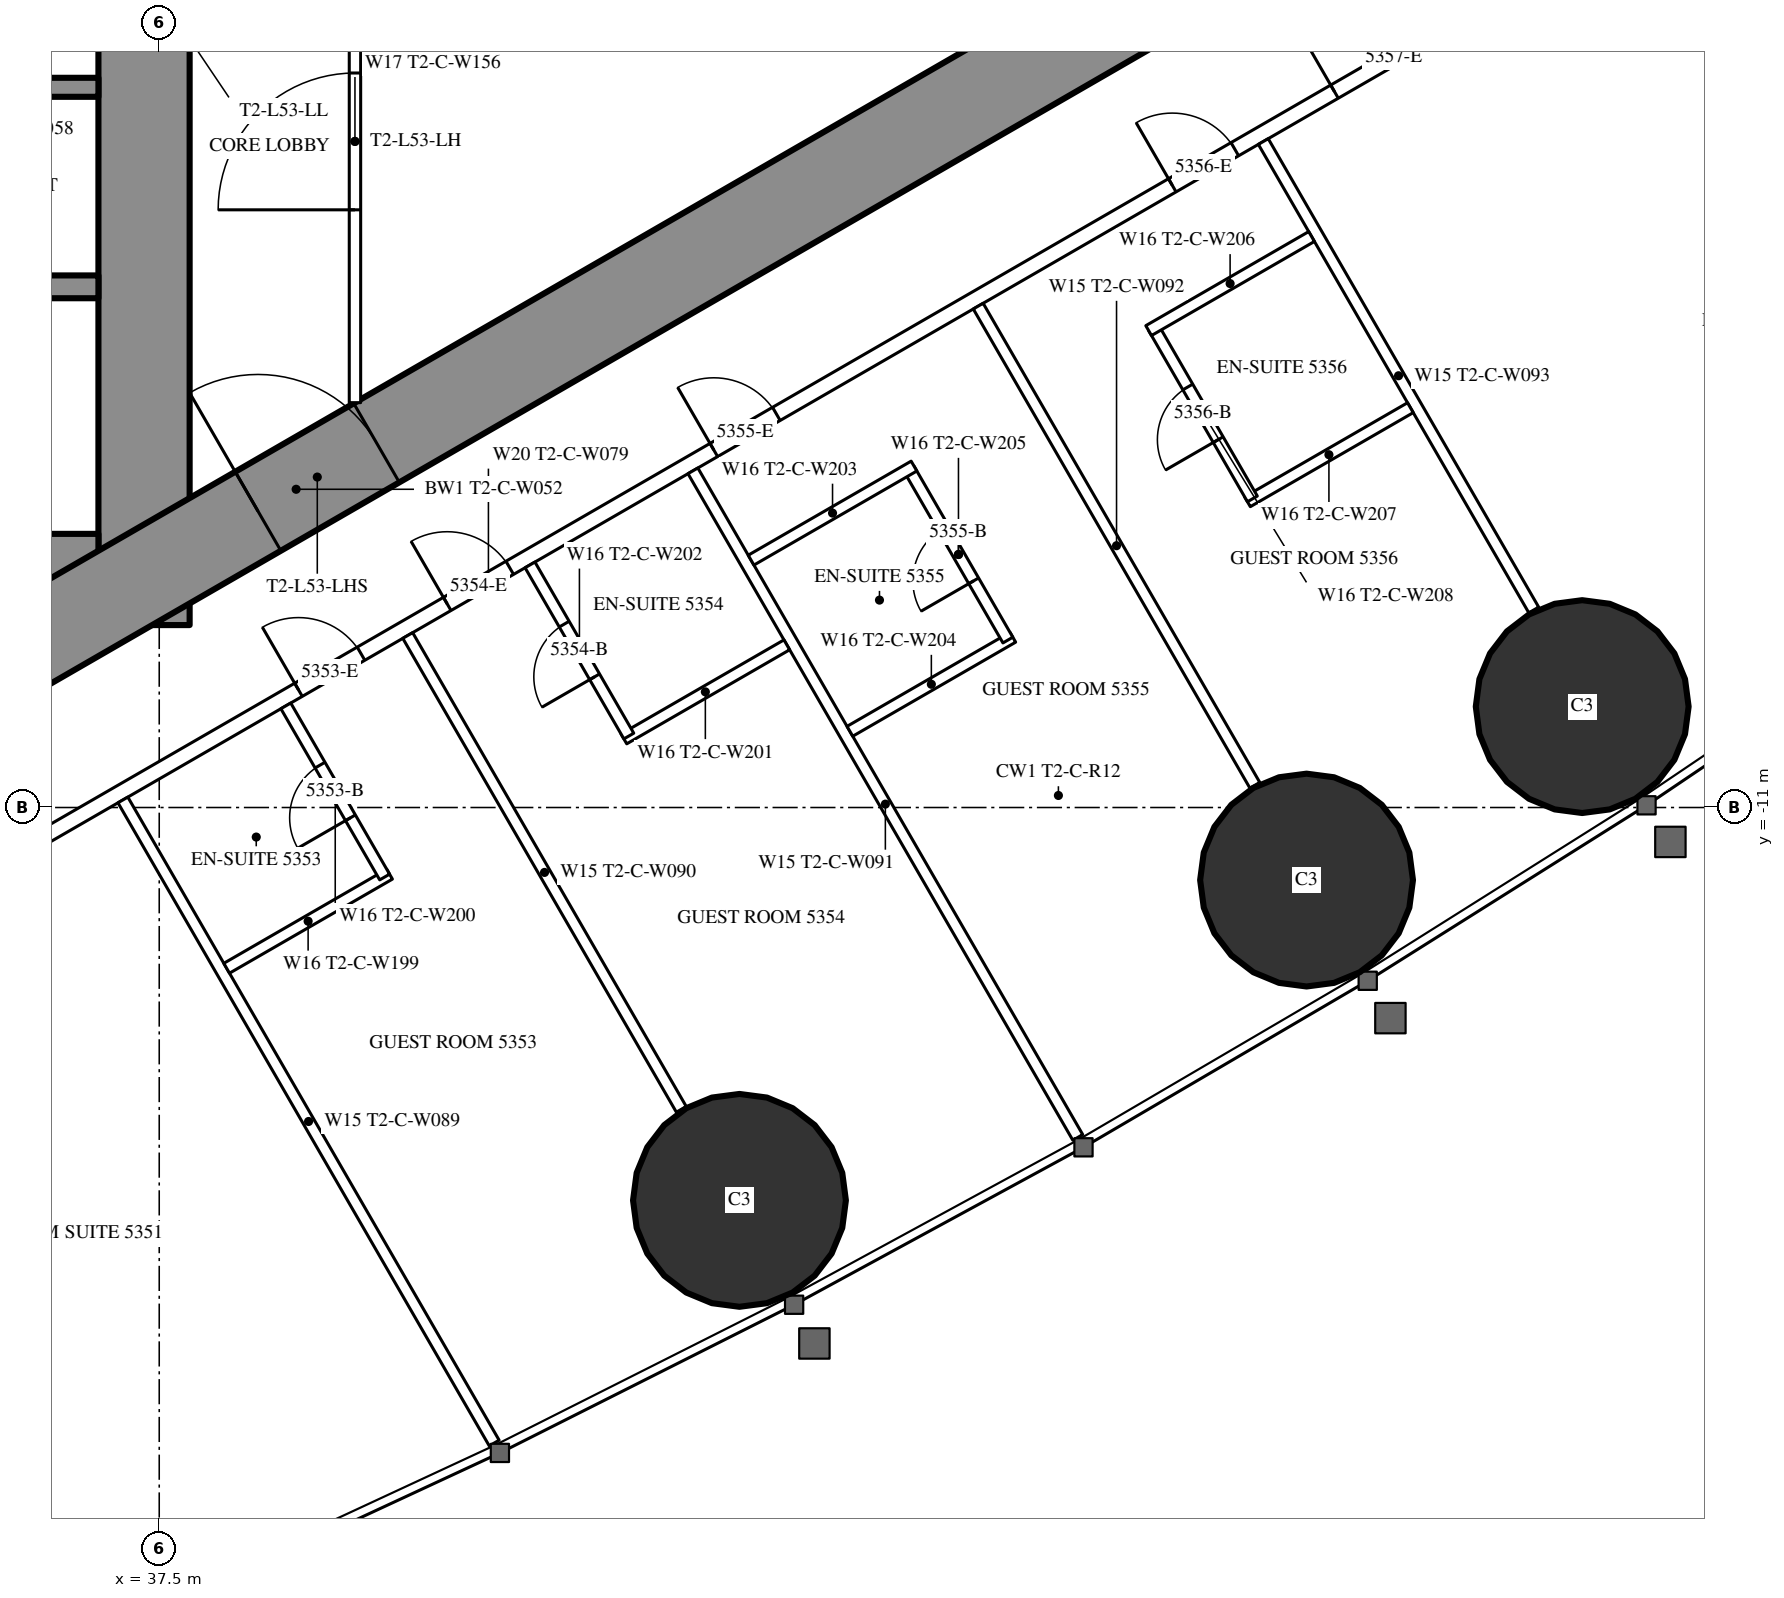
"""IFC4 building model, lengths in metres.
Left out: names, types, materials, properties, quantities, classifications, styles, units other than length and angle.
Written with IfcOpenShell. Run it as: python <this file> out.ifc"""

import sys

from ifc_helpers import new_model, si_unit, direction, frame, frame_2d, origin, origin_2d, place, context, subcontext, project, spatial, rectangle, circle, extrude, element, fill, save


model = new_model("IFC4")
c1 = context("Model", 3, precision=1e-05, world=origin(), true_north=direction((0.0, 1.0)))
c2 = subcontext(c1, "Body", "Model", "MODEL_VIEW")
j1 = project(units=[si_unit("LENGTHUNIT", "METRE"), si_unit("PLANEANGLEUNIT", "RADIAN")], contexts=[c1])
p1 = place(None, origin())
s1 = spatial("IfcSite", under=j1, at=p1, CompositionType="ELEMENT")
p2 = place(p1, origin())
s2 = spatial("IfcBuilding", under=s1, at=p2, CompositionType="ELEMENT")
p3 = place(p2, frame((0.0, 0.0, 198.3)))
s3 = spatial("IfcBuildingStorey", under=s2, at=p3, CompositionType="ELEMENT", Elevation=198.3)
for number, where, z_axis, x_axis in (
    (1, (45.134, -16.168, 0.0), (0.0, 0.0, 1.0), (1.0, 0.0, 0.0)),
    (2, (52.594, -11.955, 0.0), (0.0, 0.0, 1.0), (1.0, 0.0, 0.0)),
    (3, (56.221, -9.672, 0.0), (0.0, 0.0, 1.0), (1.0, 0.0, 0.0)),
):
    element("IfcColumn", number, at=place(p3, frame(where, z_axis=z_axis, x_axis=x_axis)), inside=s3, PredefinedType="COLUMN", context=c2, shape_type="SweptSolid", body=[
        extrude(circle(Radius=1.4, at=origin_2d()), origin(), (0.0, 0.0, 1.0), 3.5),
    ])
p4 = place(p3, frame((37.3, -8.6, 0.0), z_axis=(0.0, 0.0, 1.0), x_axis=(0.0, 1.0, 0.0)))
e4 = element("IfcWall", 4, at=p4, inside=s3, PredefinedType="SHEAR", context=c2, shape_type="SweptSolid", body=[
    extrude(rectangle(XDim=17.2, YDim=1.2, at=frame_2d((8.6, 0.0))), origin(), (0.0, 0.0, 1.0), 3.5),
])
p5 = place(p4, frame((7.7, 0.0, 0.0)))
e5 = element("IfcOpeningElement", 5, at=p5, cuts=e4, PredefinedType="OPENING", context=c2, shape_type="SweptSolid", body=[
    extrude(rectangle(XDim=1.8, YDim=2.2, at=frame_2d((0.9, 1.1))), frame((0.0, 0.61, 0.0), z_axis=(0.0, -1.0, 0.0), x_axis=(1.0, 0.0, 0.0)), (0.0, 0.0, 1.0), 1.22),
])
p6 = place(p3, frame((28.3, -8.0, 0.0), z_axis=(0.0, 0.0, 1.0), x_axis=(1.0, 0.0, 0.0)))
e6 = element("IfcWall", 6, at=p6, inside=s3, PredefinedType="SHEAR", context=c2, shape_type="SweptSolid", body=[
    extrude(rectangle(XDim=8.4, YDim=1.2, at=frame_2d((4.2, 0.0))), origin(), (0.0, 0.0, 1.0), 3.5),
])
p7 = place(p6, frame((0.25, 0.0, 0.0)))
e7 = element("IfcOpeningElement", 7, at=p7, cuts=e6, PredefinedType="OPENING", context=c2, shape_type="SweptSolid", body=[
    extrude(rectangle(XDim=1.0, YDim=2.2, at=frame_2d((0.5, 1.1))), frame((0.0, 0.61, 0.0), z_axis=(0.0, -1.0, 0.0), x_axis=(1.0, 0.0, 0.0)), (0.0, 0.0, 1.0), 1.22),
])
p8 = place(p3, frame((28.3, -4.15, 0.0), z_axis=(0.0, 0.0, 1.0), x_axis=(1.0, 0.0, 0.0)))
e8 = element("IfcWall", 8, at=p8, inside=s3, PredefinedType="SHEAR", context=c2, shape_type="SweptSolid", body=[
    extrude(rectangle(XDim=8.4, YDim=0.3, at=frame_2d((4.2, 0.0))), origin(), (0.0, 0.0, 1.0), 3.5),
])
p9 = place(p3, frame((34.25, -1.525, 0.0), z_axis=(0.0, 0.0, 1.0), x_axis=(1.0, 0.0, 0.0)))
e9 = element("IfcWall", 9, at=p9, inside=s3, PredefinedType="SHEAR", context=c2, shape_type="SweptSolid", body=[
    extrude(rectangle(XDim=2.45, YDim=0.25, at=frame_2d((1.225, 0.0))), origin(), (0.0, 0.0, 1.0), 3.5),
])
p10 = place(p3, frame((27.2, -13.8, 0.0), z_axis=(0.0, 0.0, 1.0), x_axis=(0.866027159892, 0.499996958321, 0.0)))
e10 = element("IfcWall", 10, at=p10, inside=s3, PredefinedType="SHEAR", context=c2, shape_type="SweptSolid", body=[
    extrude(rectangle(XDim=27.947, YDim=1.2, at=frame_2d((13.973, 0.0))), origin(), (0.0, 0.0, 1.0), 3.5),
])
p11 = place(p10, frame((4.6, 0.0, 0.0)))
e11 = element("IfcOpeningElement", 11, at=p11, cuts=e10, PredefinedType="OPENING", context=c2, shape_type="SweptSolid", body=[
    extrude(rectangle(XDim=1.0, YDim=2.2, at=frame_2d((0.5, 1.1))), frame((0.0, 0.61, 0.0), z_axis=(0.0, -1.0, 0.0), x_axis=(1.0, 0.0, 0.0)), (0.0, 0.0, 1.0), 1.22),
])
p12 = place(p10, frame((13.395, 0.0, 0.0)))
e12 = element("IfcOpeningElement", 12, at=p12, cuts=e10, PredefinedType="OPENING", context=c2, shape_type="SweptSolid", body=[
    extrude(rectangle(XDim=1.8, YDim=2.2, at=frame_2d((0.9, 1.1))), frame((0.0, 0.61, 0.0), z_axis=(0.0, -1.0, 0.0), x_axis=(1.0, 0.0, 0.0)), (0.0, 0.0, 1.0), 1.22),
])
p13 = place(p3, frame((27.959, -16.017, 0.0), z_axis=(0.0, 0.0, 1.0), x_axis=(0.866024151371, 0.500002169237, 0.0)))
e13 = element("IfcWall", 13, at=p13, inside=s3, PredefinedType="PARTITIONING", context=c2, shape_type="SweptSolid", body=[
    extrude(rectangle(XDim=32.034, YDim=0.2, at=frame_2d((16.017, 0.0))), origin(), (0.0, 0.0, 1.0), 3.25),
])
p14 = place(p13, frame((0.6, 0.0, 0.0)))
e14 = element("IfcOpeningElement", 14, at=p14, cuts=e13, PredefinedType="OPENING", context=c2, shape_type="SweptSolid", body=[
    extrude(rectangle(XDim=0.95, YDim=2.2, at=frame_2d((0.475, 1.1))), frame((0.0, 0.11, 0.0), z_axis=(0.0, -1.0, 0.0), x_axis=(1.0, 0.0, 0.0)), (0.0, 0.0, 1.0), 0.22),
])
p15 = place(p13, frame((13.132, 0.0, 0.0)))
e15 = element("IfcOpeningElement", 15, at=p15, cuts=e13, PredefinedType="OPENING", context=c2, shape_type="SweptSolid", body=[
    extrude(rectangle(XDim=0.95, YDim=2.2, at=frame_2d((0.475, 1.1))), frame((0.0, 0.11, 0.0), z_axis=(0.0, -1.0, 0.0), x_axis=(1.0, 0.0, 0.0)), (0.0, 0.0, 1.0), 0.22),
])
p16 = place(p13, frame((15.391, 0.0, 0.0)))
e16 = element("IfcOpeningElement", 16, at=p16, cuts=e13, PredefinedType="OPENING", context=c2, shape_type="SweptSolid", body=[
    extrude(rectangle(XDim=0.95, YDim=2.2, at=frame_2d((0.475, 1.1))), frame((0.0, 0.11, 0.0), z_axis=(0.0, -1.0, 0.0), x_axis=(1.0, 0.0, 0.0)), (0.0, 0.0, 1.0), 0.22),
])
p17 = place(p13, frame((19.441, 0.0, 0.0)))
e17 = element("IfcOpeningElement", 17, at=p17, cuts=e13, PredefinedType="OPENING", context=c2, shape_type="SweptSolid", body=[
    extrude(rectangle(XDim=0.95, YDim=2.2, at=frame_2d((0.475, 1.1))), frame((0.0, 0.11, 0.0), z_axis=(0.0, -1.0, 0.0), x_axis=(1.0, 0.0, 0.0)), (0.0, 0.0, 1.0), 0.22),
])
p18 = place(p13, frame((26.406, 0.0, 0.0)))
e18 = element("IfcOpeningElement", 18, at=p18, cuts=e13, PredefinedType="OPENING", context=c2, shape_type="SweptSolid", body=[
    extrude(rectangle(XDim=0.95, YDim=2.2, at=frame_2d((0.475, 1.1))), frame((0.0, 0.11, 0.0), z_axis=(0.0, -1.0, 0.0), x_axis=(1.0, 0.0, 0.0)), (0.0, 0.0, 1.0), 0.22),
])
p19 = place(p13, frame((28.87, 0.0, 0.0)))
e19 = element("IfcOpeningElement", 19, at=p19, cuts=e13, PredefinedType="OPENING", context=c2, shape_type="SweptSolid", body=[
    extrude(rectangle(XDim=1.8, YDim=2.2, at=frame_2d((0.9, 1.1))), frame((0.0, 0.11, 0.0), z_axis=(0.0, -1.0, 0.0), x_axis=(1.0, 0.0, 0.0)), (0.0, 0.0, 1.0), 0.22),
])
p20 = place(p3, frame((37.022, -10.9, 0.0), z_axis=(0.0, 0.0, 1.0), x_axis=(0.499998620953, -0.866026199976, 0.0)))
e20 = element("IfcWall", 20, at=p20, inside=s3, PredefinedType="PARTITIONING", context=c2, shape_type="SweptSolid", body=[
    extrude(rectangle(XDim=9.77, YDim=0.15, at=frame_2d((4.885, 0.0))), origin(), (0.0, 0.0, 1.0), 3.25),
])
p21 = place(p3, frame((40.769, -8.737, 0.0), z_axis=(0.0, 0.0, 1.0), x_axis=(0.500013115284, -0.866017831539, 0.0)))
e21 = element("IfcWall", 21, at=p21, inside=s3, PredefinedType="PARTITIONING", context=c2, shape_type="SweptSolid", body=[
    extrude(rectangle(XDim=7.198, YDim=0.15, at=frame_2d((3.599, 0.0))), origin(), (0.0, 0.0, 1.0), 2.3),
])
p22 = place(p3, frame((44.521, -6.571, 0.0), z_axis=(0.0, 0.0, 1.0), x_axis=(0.500010457486, -0.866019366068, 0.0)))
e22 = element("IfcWall", 22, at=p22, inside=s3, PredefinedType="PARTITIONING", context=c2, shape_type="SweptSolid", body=[
    extrude(rectangle(XDim=10.126, YDim=0.15, at=frame_2d((5.063, 0.0))), origin(), (0.0, 0.0, 1.0), 3.25),
])
p23 = place(p3, frame((48.275, -4.404, 0.0), z_axis=(0.0, 0.0, 1.0), x_axis=(0.500006004368, -0.866021937133, 0.0)))
e23 = element("IfcWall", 23, at=p23, inside=s3, PredefinedType="PARTITIONING", context=c2, shape_type="SweptSolid", body=[
    extrude(rectangle(XDim=7.279, YDim=0.15, at=frame_2d((3.64, 0.0))), origin(), (0.0, 0.0, 1.0), 2.3),
])
p24 = place(p3, frame((52.025, -2.238, 0.0), z_axis=(0.0, 0.0, 1.0), x_axis=(0.499983785035, -0.866034765296, 0.0)))
e24 = element("IfcWall", 24, at=p24, inside=s3, PredefinedType="PARTITIONING", context=c2, shape_type="SweptSolid", body=[
    extrude(rectangle(XDim=7.116, YDim=0.15, at=frame_2d((3.558, 0.0))), origin(), (0.0, 0.0, 1.0), 2.3),
])
p25 = place(p3, frame((38.387, -13.115, 0.0), z_axis=(0.0, 0.0, 1.0), x_axis=(0.866073894602, 0.499916002032, 0.0)))
e25 = element("IfcWall", 25, at=p25, inside=s3, PredefinedType="PARTITIONING", context=c2, shape_type="SweptSolid", body=[
    extrude(rectangle(XDim=2.475, YDim=0.15, at=frame_2d((1.238, 0.0))), origin(), (0.0, 0.0, 1.0), 3.25),
])
p26 = place(p3, frame((39.166, -9.663, 0.0), z_axis=(0.0, 0.0, 1.0), x_axis=(0.500006934395, -0.866021400173, 0.0)))
e26 = element("IfcWall", 26, at=p26, inside=s3, PredefinedType="PARTITIONING", context=c2, shape_type="SweptSolid", body=[
    extrude(rectangle(XDim=2.6, YDim=0.15, at=frame_2d((1.3, 0.0))), origin(), (0.0, 0.0, 1.0), 3.25),
])
p27 = place(p26, frame((0.9, 0.0, 0.0)))
e27 = element("IfcOpeningElement", 27, at=p27, cuts=e26, PredefinedType="OPENING", context=c2, shape_type="SweptSolid", body=[
    extrude(rectangle(XDim=0.8, YDim=2.2, at=frame_2d((0.4, 1.1))), frame((0.0, 0.085, 0.0), z_axis=(0.0, -1.0, 0.0), x_axis=(1.0, 0.0, 0.0)), (0.0, 0.0, 1.0), 0.17),
])
p28 = place(p3, frame((43.613, -10.097, 0.0), z_axis=(0.0, 0.0, 1.0), x_axis=(0.866031185235, 0.4999899861, 0.0)))
e28 = element("IfcWall", 28, at=p28, inside=s3, PredefinedType="PARTITIONING", context=c2, shape_type="SweptSolid", body=[
    extrude(rectangle(XDim=2.475, YDim=0.15, at=frame_2d((1.238, 0.0))), origin(), (0.0, 0.0, 1.0), 3.25),
])
p29 = place(p3, frame((42.378, -7.808, 0.0), z_axis=(0.0, 0.0, 1.0), x_axis=(0.500006934395, -0.866021400173, 0.0)))
e29 = element("IfcWall", 29, at=p29, inside=s3, PredefinedType="PARTITIONING", context=c2, shape_type="SweptSolid", body=[
    extrude(rectangle(XDim=2.6, YDim=0.15, at=frame_2d((1.3, 0.0))), origin(), (0.0, 0.0, 1.0), 3.25),
])
p30 = place(p29, frame((0.9, 0.0, 0.0)))
e30 = element("IfcOpeningElement", 30, at=p30, cuts=e29, PredefinedType="OPENING", context=c2, shape_type="SweptSolid", body=[
    extrude(rectangle(XDim=0.8, YDim=2.2, at=frame_2d((0.4, 1.1))), frame((0.0, 0.085, 0.0), z_axis=(0.0, -1.0, 0.0), x_axis=(1.0, 0.0, 0.0)), (0.0, 0.0, 1.0), 0.17),
])
p31 = place(p3, frame((46.586, -9.997, 0.0), z_axis=(0.0, 0.0, 1.0), x_axis=(0.866006523861, 0.500032699561, 0.0)))
e31 = element("IfcWall", 31, at=p31, inside=s3, PredefinedType="PARTITIONING", context=c2, shape_type="SweptSolid", body=[
    extrude(rectangle(XDim=2.475, YDim=0.15, at=frame_2d((1.237, 0.0))), origin(), (0.0, 0.0, 1.0), 3.25),
])
p32 = place(p3, frame((47.365, -6.546, 0.0), z_axis=(0.0, 0.0, 1.0), x_axis=(0.500006934395, -0.866021400173, 0.0)))
e32 = element("IfcWall", 32, at=p32, inside=s3, PredefinedType="PARTITIONING", context=c2, shape_type="SweptSolid", body=[
    extrude(rectangle(XDim=2.6, YDim=0.15, at=frame_2d((1.3, 0.0))), origin(), (0.0, 0.0, 1.0), 3.25),
])
p33 = place(p32, frame((0.9, 0.0, 0.0)))
e33 = element("IfcOpeningElement", 33, at=p33, cuts=e32, PredefinedType="OPENING", context=c2, shape_type="SweptSolid", body=[
    extrude(rectangle(XDim=0.8, YDim=2.2, at=frame_2d((0.4, 1.1))), frame((0.0, 0.085, 0.0), z_axis=(0.0, -1.0, 0.0), x_axis=(1.0, 0.0, 0.0)), (0.0, 0.0, 1.0), 0.17),
])
for number, where, z_axis, x_axis in (
    (34, (45.286, -7.746, 0.0), (0.0, 0.0, 1.0), (0.866, 0.5, 0.0)),
    (35, (51.817, -6.978, 0.0), (0.0, 0.0, 1.0), (0.866, 0.5, 0.0)),
):
    element("IfcWall", number, at=place(p3, frame(where, z_axis=z_axis, x_axis=x_axis)), inside=s3, PredefinedType="PARTITIONING", context=c2, shape_type="SweptSolid", body=[
        extrude(rectangle(XDim=2.475, YDim=0.15, at=frame_2d((1.237, 0.0))), origin(), (0.0, 0.0, 1.0), 3.25),
    ])
p34 = place(p3, frame((50.582, -4.688, 0.0), z_axis=(0.0, 0.0, 1.0), x_axis=(0.500006934395, -0.866021400173, 0.0)))
e36 = element("IfcWall", 36, at=p34, inside=s3, PredefinedType="PARTITIONING", context=c2, shape_type="SweptSolid", body=[
    extrude(rectangle(XDim=2.6, YDim=0.15, at=frame_2d((1.3, 0.0))), origin(), (0.0, 0.0, 1.0), 3.25),
])
p35 = place(p34, frame((0.9, 0.0, 0.0)))
e37 = element("IfcOpeningElement", 37, at=p35, cuts=e36, PredefinedType="OPENING", context=c2, shape_type="SweptSolid", body=[
    extrude(rectangle(XDim=0.8, YDim=2.2, at=frame_2d((0.4, 1.1))), frame((0.0, 0.085, 0.0), z_axis=(0.0, -1.0, 0.0), x_axis=(1.0, 0.0, 0.0)), (0.0, 0.0, 1.0), 0.17),
])
p36 = place(p3, frame((50.517, -4.726, 0.0), z_axis=(0.0, 0.0, 1.0), x_axis=(0.866031185235, 0.4999899861, 0.0)))
e38 = element("IfcWall", 38, at=p36, inside=s3, PredefinedType="PARTITIONING", context=c2, shape_type="SweptSolid", body=[
    extrude(rectangle(XDim=2.475, YDim=0.15, at=frame_2d((1.238, 0.0))), origin(), (0.0, 0.0, 1.0), 3.25),
])
p37 = place(p3, frame((40.075, -5.674, 0.0), z_axis=(0.0, 0.0, 1.0), x_axis=(0.0, 1.0, 0.0)))
e39 = element("IfcWall", 39, at=p37, inside=s3, PredefinedType="PARTITIONING", context=c2, shape_type="SweptSolid", body=[
    extrude(rectangle(XDim=6.874, YDim=0.15, at=frame_2d((3.437, 0.0))), origin(), (0.0, 0.0, 1.0), 3.25),
])
p38 = place(p37, frame((2.537, 0.0, 0.0)))
e40 = element("IfcOpeningElement", 40, at=p38, cuts=e39, PredefinedType="OPENING", context=c2, shape_type="SweptSolid", body=[
    extrude(rectangle(XDim=1.8, YDim=2.2, at=frame_2d((0.9, 1.1))), frame((0.0, 0.085, 0.0), z_axis=(0.0, -1.0, 0.0), x_axis=(1.0, 0.0, 0.0)), (0.0, 0.0, 1.0), 0.17),
])
p39 = place(p27, origin())
e41 = element("IfcDoor", 41, at=p39, inside=s3, OperationType="SINGLE_SWING_RIGHT", PredefinedType="DOOR", context=c2, shape_type="SweptSolid", body=[
    extrude(rectangle(XDim=0.8, YDim=2.2, at=frame_2d((0.4, 1.1))), frame((0.0, 0.025, 0.0), z_axis=(0.0, -1.0, 0.0), x_axis=(1.0, 0.0, 0.0)), (0.0, 0.0, 1.0), 0.05),
])
fill(e27, e41)
p40 = place(p15, origin())
e42 = element("IfcDoor", 42, at=p40, inside=s3, OperationType="SINGLE_SWING_LEFT", PredefinedType="DOOR", context=c2, shape_type="SweptSolid", body=[
    extrude(rectangle(XDim=0.95, YDim=2.2, at=frame_2d((0.475, 1.1))), frame((0.0, 0.025, 0.0), z_axis=(0.0, -1.0, 0.0), x_axis=(1.0, 0.0, 0.0)), (0.0, 0.0, 1.0), 0.05),
])
fill(e15, e42)
p41 = place(p30, origin())
e43 = element("IfcDoor", 43, at=p41, inside=s3, OperationType="SINGLE_SWING_RIGHT", PredefinedType="DOOR", context=c2, shape_type="SweptSolid", body=[
    extrude(rectangle(XDim=0.8, YDim=2.2, at=frame_2d((0.4, 1.1))), frame((0.0, 0.025, 0.0), z_axis=(0.0, -1.0, 0.0), x_axis=(1.0, 0.0, 0.0)), (0.0, 0.0, 1.0), 0.05),
])
fill(e30, e43)
p42 = place(p16, origin())
e44 = element("IfcDoor", 44, at=p42, inside=s3, OperationType="SINGLE_SWING_LEFT", PredefinedType="DOOR", context=c2, shape_type="SweptSolid", body=[
    extrude(rectangle(XDim=0.95, YDim=2.2, at=frame_2d((0.475, 1.1))), frame((0.0, 0.025, 0.0), z_axis=(0.0, -1.0, 0.0), x_axis=(1.0, 0.0, 0.0)), (0.0, 0.0, 1.0), 0.05),
])
fill(e16, e44)
p43 = place(p33, origin())
e45 = element("IfcDoor", 45, at=p43, inside=s3, OperationType="SINGLE_SWING_RIGHT", PredefinedType="DOOR", context=c2, shape_type="SweptSolid", body=[
    extrude(rectangle(XDim=0.8, YDim=2.2, at=frame_2d((0.4, 1.1))), frame((0.0, 0.025, 0.0), z_axis=(0.0, -1.0, 0.0), x_axis=(1.0, 0.0, 0.0)), (0.0, 0.0, 1.0), 0.05),
])
fill(e33, e45)
p44 = place(p17, origin())
e46 = element("IfcDoor", 46, at=p44, inside=s3, OperationType="SINGLE_SWING_LEFT", PredefinedType="DOOR", context=c2, shape_type="SweptSolid", body=[
    extrude(rectangle(XDim=0.95, YDim=2.2, at=frame_2d((0.475, 1.1))), frame((0.0, 0.025, 0.0), z_axis=(0.0, -1.0, 0.0), x_axis=(1.0, 0.0, 0.0)), (0.0, 0.0, 1.0), 0.05),
])
fill(e17, e46)
p45 = place(p35, origin())
e47 = element("IfcDoor", 47, at=p45, inside=s3, OperationType="SINGLE_SWING_RIGHT", PredefinedType="DOOR", context=c2, shape_type="SweptSolid", body=[
    extrude(rectangle(XDim=0.8, YDim=2.2, at=frame_2d((0.4, 1.1))), frame((0.0, 0.025, 0.0), z_axis=(0.0, -1.0, 0.0), x_axis=(1.0, 0.0, 0.0)), (0.0, 0.0, 1.0), 0.05),
])
fill(e37, e47)
p46 = place(p18, origin())
e48 = element("IfcDoor", 48, at=p46, inside=s3, OperationType="SINGLE_SWING_LEFT", PredefinedType="DOOR", context=c2, shape_type="SweptSolid", body=[
    extrude(rectangle(XDim=0.95, YDim=2.2, at=frame_2d((0.475, 1.1))), frame((0.0, 0.025, 0.0), z_axis=(0.0, -1.0, 0.0), x_axis=(1.0, 0.0, 0.0)), (0.0, 0.0, 1.0), 0.05),
])
fill(e18, e48)
p47 = place(p19, origin())
e49 = element("IfcDoor", 49, at=p47, inside=s3, OperationType="DOUBLE_DOOR_SINGLE_SWING", PredefinedType="DOOR", context=c2, shape_type="SweptSolid", body=[
    extrude(rectangle(XDim=1.8, YDim=2.2, at=frame_2d((0.9, 1.1))), frame((0.0, 0.025, 0.0), z_axis=(0.0, -1.0, 0.0), x_axis=(1.0, 0.0, 0.0)), (0.0, 0.0, 1.0), 0.05),
])
fill(e19, e49)
p48 = place(p38, origin())
e50 = element("IfcDoor", 50, at=p48, inside=s3, OperationType="DOUBLE_DOOR_SINGLE_SWING", PredefinedType="DOOR", context=c2, shape_type="SweptSolid", body=[
    extrude(rectangle(XDim=1.8, YDim=2.2, at=frame_2d((0.9, 1.1))), frame((0.0, 0.025, 0.0), z_axis=(0.0, -1.0, 0.0), x_axis=(1.0, 0.0, 0.0)), (0.0, 0.0, 1.0), 0.05),
])
fill(e40, e50)
p49 = place(p12, origin())
e51 = element("IfcDoor", 51, at=p49, inside=s3, OperationType="DOUBLE_DOOR_SINGLE_SWING", PredefinedType="DOOR", context=c2, shape_type="SweptSolid", body=[
    extrude(rectangle(XDim=1.8, YDim=2.2, at=frame_2d((0.9, 1.1))), frame((0.0, 0.025, 0.0), z_axis=(0.0, -1.0, 0.0), x_axis=(1.0, 0.0, 0.0)), (0.0, 0.0, 1.0), 0.05),
])
fill(e12, e51)
save(model, sys.argv[1])
